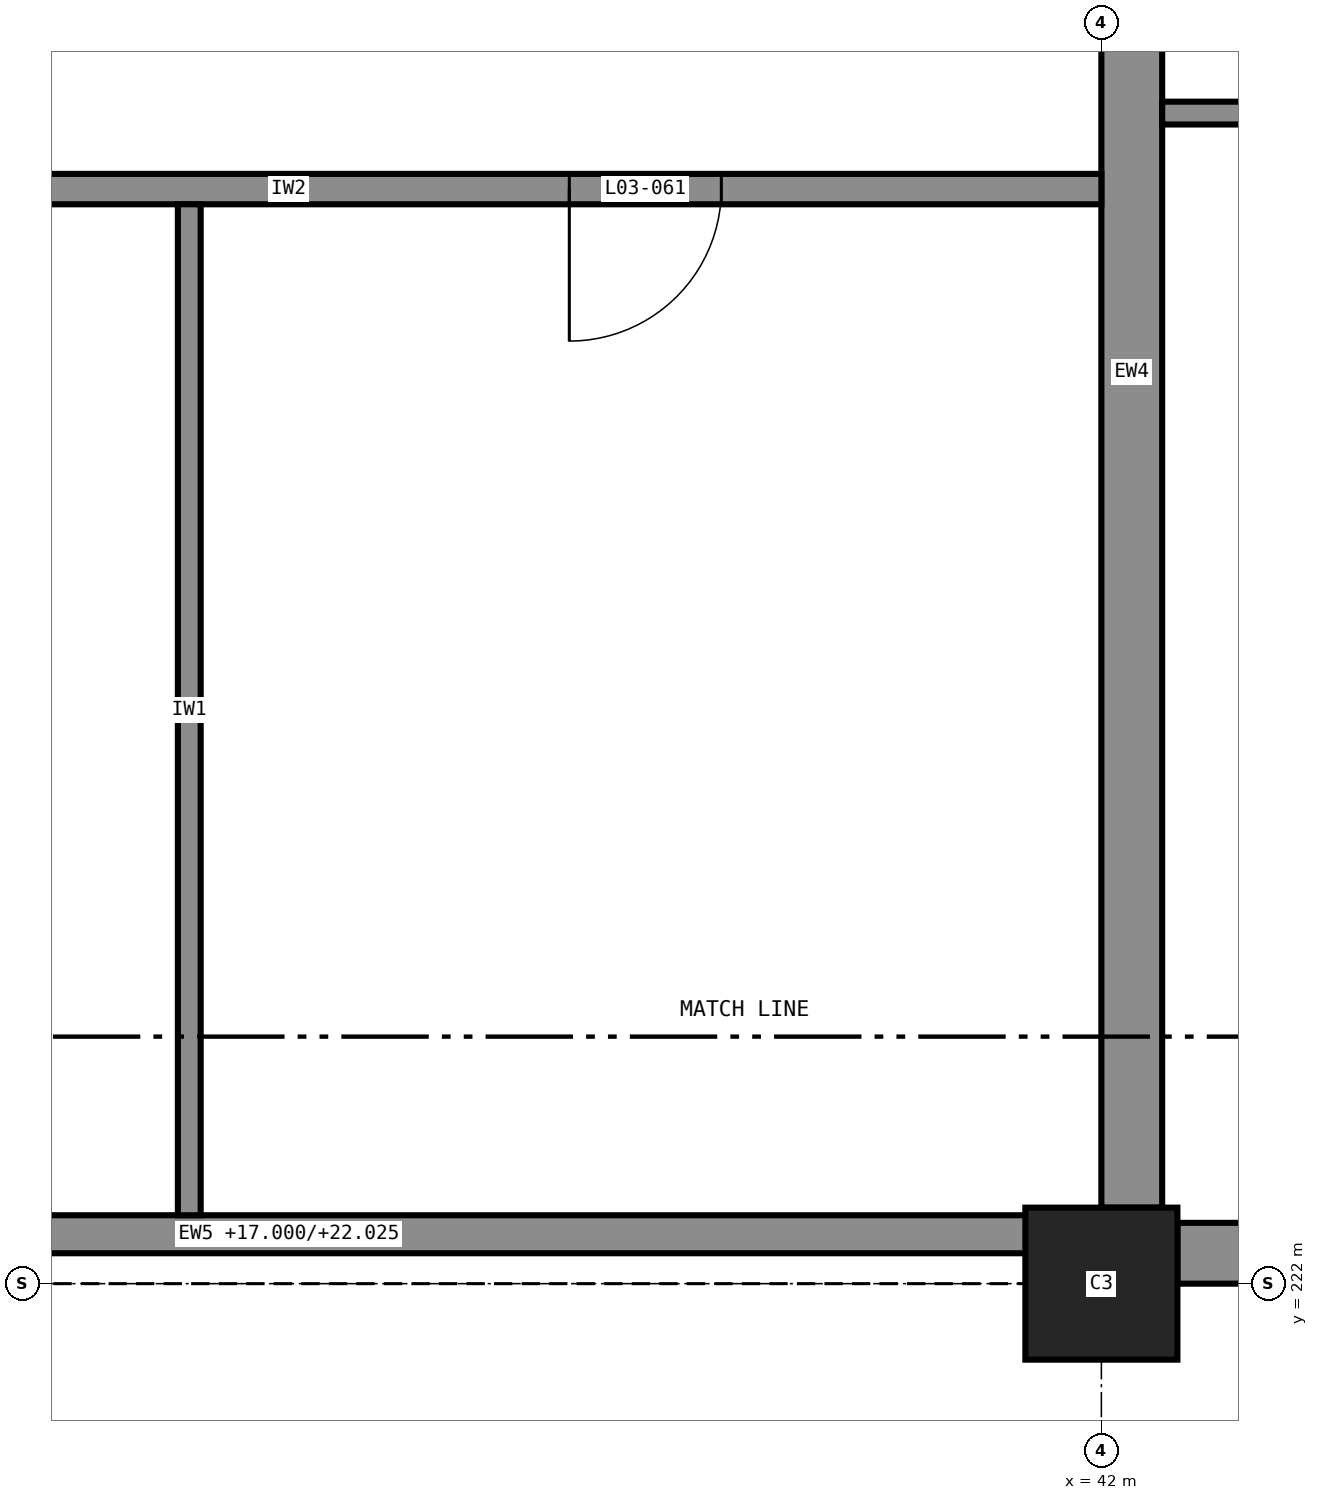
"""IFC4 building model, lengths in metres.
Left out: names, types, materials, properties, quantities, classifications, styles, units other than length and angle.
Written with IfcOpenShell. Run it as: python <this file> out.ifc"""

import sys

from ifc_helpers import new_model, si_unit, direction, frame, frame_2d, origin, origin_2d, place, context, subcontext, project, spatial, polyline, rectangle, outline, extrude, element, fill, save


model = new_model("IFC4")
c1 = context("Model", 3, precision=1e-05, world=origin(), true_north=direction((0.0, 1.0)))
c2 = subcontext(c1, "Body", "Model", "MODEL_VIEW")
j1 = project(units=[si_unit("LENGTHUNIT", "METRE"), si_unit("PLANEANGLEUNIT", "RADIAN")], contexts=[c1])
p1 = place(None, origin())
s1 = spatial("IfcSite", under=j1, at=p1, CompositionType="ELEMENT")
p2 = place(p1, origin())
s2 = spatial("IfcBuilding", under=s1, at=p2, CompositionType="ELEMENT")
p3 = place(p2, frame((0.0, 0.0, 17.0)))
s3 = spatial("IfcBuildingStorey", under=s2, at=p3, CompositionType="ELEMENT", Elevation=17.0)
p4 = place(p3, frame((42.0, 222.0, 0.0), z_axis=(0.0, 0.0, 1.0), x_axis=(1.0, 0.0, 0.0)))
e1 = element("IfcColumn", 1, at=p4, inside=s3, PredefinedType="COLUMN", context=c2, shape_type="SweptSolid", body=[
    extrude(rectangle(XDim=1.0, YDim=1.0, at=origin_2d()), origin(), (0.0, 0.0, 1.0), 4.0),
])
for number, where, z_axis, x_axis in (
    (2, (42.5, 222.2, 0.0), (0.0, 0.0, 1.0), (1.0, 0.0, 0.0)),
    (3, (42.2, 233.5, 0.0), (0.0, 0.0, 1.0), (0.0, -1.0, 0.0)),
):
    element("IfcWall", number, at=place(p3, frame(where, z_axis=z_axis, x_axis=x_axis)), inside=s3, PredefinedType="SOLIDWALL", context=c2, shape_type="SweptSolid", body=[
        extrude(rectangle(XDim=11.0, YDim=0.4, at=frame_2d((5.5, 0.0))), origin(), (0.0, 0.0, 1.0), 3.0),
    ])
p5 = place(p3, frame((42.0, 222.325, 0.0), z_axis=(0.0, 0.0, 1.0), x_axis=(-1.0, 0.0, 0.0)))
e4 = element("IfcWall", 4, at=p5, inside=s3, PredefinedType="STANDARD", context=c2, shape_type="SweptSolid", body=[
    extrude(outline(polyline([(0.0, 0.0), (12.0, 0.0), (12.0, 4.425), (0.0, 5.025), (0.0, 0.0)])), frame((0.0, 0.125, 0.0), z_axis=(0.0, -1.0, 0.0), x_axis=(1.0, 0.0, 0.0)), (0.0, 0.0, 1.0), 0.25),
])
p6 = place(p3, frame((23.9, 229.2, 0.0), z_axis=(0.0, 0.0, 1.0), x_axis=(1.0, 0.0, 0.0)))
e5 = element("IfcWall", 5, at=p6, inside=s3, PredefinedType="PARTITIONING", context=c2, shape_type="SweptSolid", body=[
    extrude(rectangle(XDim=18.1, YDim=0.2, at=frame_2d((9.05, 0.0))), origin(), (0.0, 0.0, 1.0), 3.8),
])
p7 = place(p6, frame((8.6, 0.0, 0.0)))
e6 = element("IfcOpeningElement", 6, at=p7, cuts=e5, PredefinedType="OPENING", context=c2, shape_type="SweptSolid", body=[
    extrude(rectangle(XDim=1.0, YDim=2.1, at=frame_2d((0.5, 1.05))), frame((0.0, 0.11, 0.0), z_axis=(0.0, -1.0, 0.0), x_axis=(1.0, 0.0, 0.0)), (0.0, 0.0, 1.0), 0.22),
])
p8 = place(p6, frame((14.6, 0.0, 0.0)))
e7 = element("IfcOpeningElement", 7, at=p8, cuts=e5, PredefinedType="OPENING", context=c2, shape_type="SweptSolid", body=[
    extrude(rectangle(XDim=1.0, YDim=2.1, at=frame_2d((0.5, 1.05))), frame((0.0, 0.11, 0.0), z_axis=(0.0, -1.0, 0.0), x_axis=(1.0, 0.0, 0.0)), (0.0, 0.0, 1.0), 0.22),
])
p9 = place(p3, frame((36.0, 222.45, 0.0), z_axis=(0.0, 0.0, 1.0), x_axis=(0.0, 1.0, 0.0)))
e8 = element("IfcWall", 8, at=p9, inside=s3, PredefinedType="PARTITIONING", context=c2, shape_type="SweptSolid", body=[
    extrude(rectangle(XDim=6.65, YDim=0.15, at=frame_2d((3.325, 0.0))), origin(), (0.0, 0.0, 1.0), 3.8),
])
p10 = place(p3, frame((66.1, 229.7, 0.0), z_axis=(0.0, 0.0, 1.0), x_axis=(-1.0, 0.0, 0.0)))
e9 = element("IfcWall", 9, at=p10, inside=s3, PredefinedType="PARTITIONING", context=c2, shape_type="SweptSolid", body=[
    extrude(rectangle(XDim=23.7, YDim=0.15, at=frame_2d((11.85, 0.0))), origin(), (0.0, 0.0, 1.0), 3.8),
])
p11 = place(p10, frame((15.6, 0.0, 0.0)))
e10 = element("IfcOpeningElement", 10, at=p11, cuts=e9, PredefinedType="OPENING", context=c2, shape_type="SweptSolid", body=[
    extrude(rectangle(XDim=1.0, YDim=2.1, at=frame_2d((0.5, 1.05))), frame((0.0, 0.085, 0.0), z_axis=(0.0, -1.0, 0.0), x_axis=(1.0, 0.0, 0.0)), (0.0, 0.0, 1.0), 0.17),
])
p12 = place(p10, frame((6.6, 0.0, 0.0)))
e11 = element("IfcOpeningElement", 11, at=p12, cuts=e9, PredefinedType="OPENING", context=c2, shape_type="SweptSolid", body=[
    extrude(rectangle(XDim=1.0, YDim=2.1, at=frame_2d((0.5, 1.05))), frame((0.0, 0.085, 0.0), z_axis=(0.0, -1.0, 0.0), x_axis=(1.0, 0.0, 0.0)), (0.0, 0.0, 1.0), 0.17),
])
p13 = place(p8, frame((1.0, 0.0, 0.0), z_axis=(0.0, 0.0, 1.0), x_axis=(-1.0, 0.0, 0.0)))
e12 = element("IfcDoor", 12, at=p13, inside=s3, OperationType="SINGLE_SWING_LEFT", PredefinedType="DOOR", context=c2, shape_type="SweptSolid", body=[
    extrude(rectangle(XDim=1.0, YDim=2.1, at=frame_2d((0.5, 1.05))), frame((0.0, 0.025, 0.0), z_axis=(0.0, -1.0, 0.0), x_axis=(1.0, 0.0, 0.0)), (0.0, 0.0, 1.0), 0.05),
])
fill(e7, e12)
save(model, sys.argv[1])
